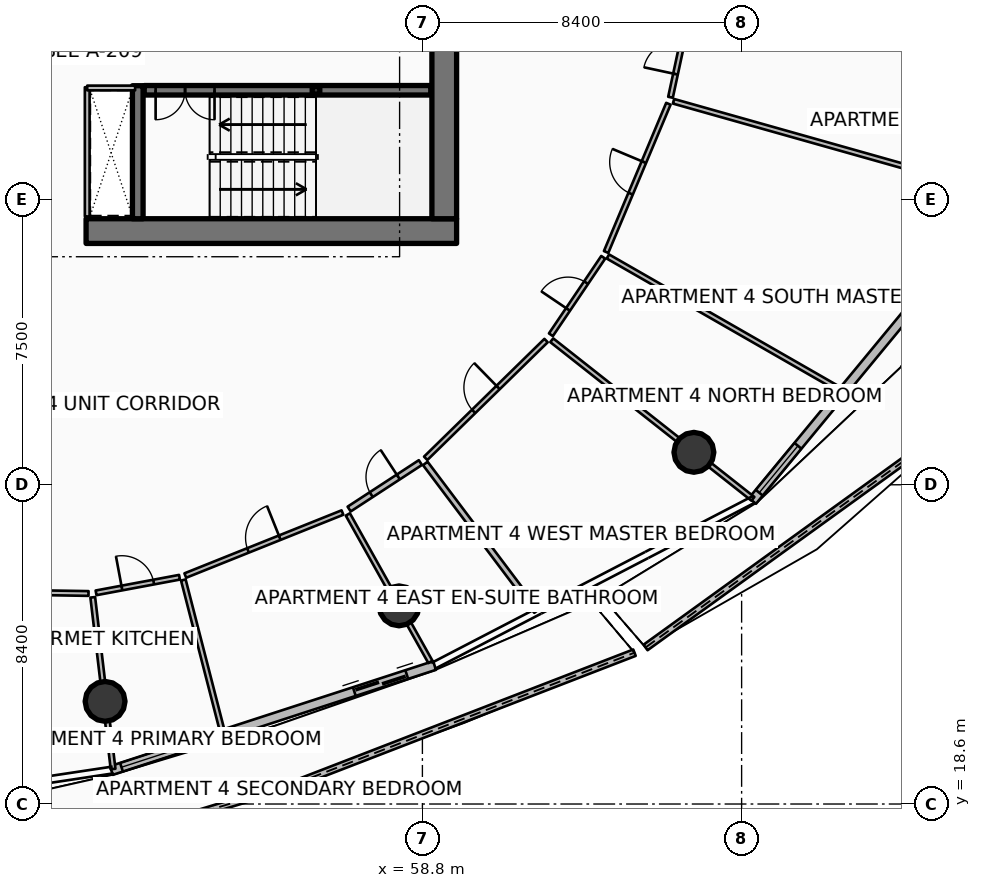
"""IFC4 building model, lengths in metres.
Left out: names, types, materials, properties, quantities, classifications, styles, units other than length and angle.
Written with IfcOpenShell. Run it as: python <this file> out.ifc"""

import sys

from ifc_helpers import new_model, si_unit, direction, frame, frame_2d, origin, origin_2d, place, context, subcontext, project, spatial, polyline, rectangle, hollow_rectangle, circle, outline, extrude, element, fill, save


model = new_model("IFC4")
c1 = context("Model", 3, precision=1e-05, world=origin(), true_north=direction((0.0, 1.0)))
c2 = subcontext(c1, "Body", "Model", "MODEL_VIEW")
j1 = project(units=[si_unit("LENGTHUNIT", "METRE"), si_unit("PLANEANGLEUNIT", "RADIAN")], contexts=[c1])
p1 = place(None, origin())
s1 = spatial("IfcSite", under=j1, at=p1, CompositionType="ELEMENT")
p2 = place(p1, origin())
s2 = spatial("IfcBuilding", under=s1, at=p2, CompositionType="ELEMENT")
p3 = place(p2, frame((0.0, 0.0, 180.3)))
s3 = spatial("IfcBuildingStorey", under=s2, at=p3, CompositionType="ELEMENT", Elevation=180.3)
p4 = place(p3, frame((49.95, 33.675, 0.0), z_axis=(0.0, 0.0, 1.0), x_axis=(1.0, 0.0, 0.0)))
e1 = element("IfcWall", 1, at=p4, inside=s3, PredefinedType="SHEAR", context=c2, shape_type="SweptSolid", body=[
    extrude(rectangle(XDim=9.75, YDim=0.65, at=frame_2d((4.875, 0.0))), origin(), (0.0, 0.0, 1.0), 3.75),
])
p5 = place(p3, frame((59.375, 34.0, 0.0), z_axis=(0.0, 0.0, 1.0), x_axis=(0.0, 1.0, 0.0)))
e2 = element("IfcWall", 2, at=p5, inside=s3, PredefinedType="SHEAR", context=c2, shape_type="SweptSolid", body=[
    extrude(rectangle(XDim=16.0, YDim=0.65, at=frame_2d((8.0, 0.0))), origin(), (0.0, 0.0, 1.0), 3.75),
])
p6 = place(p3, frame((51.31, 34.0, 0.0), z_axis=(0.0, 0.0, 1.0), x_axis=(0.0, 1.0, 0.0)))
e3 = element("IfcWall", 3, at=p6, inside=s3, PredefinedType="SHEAR", context=c2, shape_type="SweptSolid", body=[
    extrude(rectangle(XDim=3.5, YDim=0.28, at=frame_2d((1.75, 0.0))), origin(), (0.0, 0.0, 1.0), 3.75),
])
p7 = place(p3, frame((56.0, 37.38, 0.0), z_axis=(0.0, 0.0, 1.0), x_axis=(1.0, 0.0, 0.0)))
e4 = element("IfcColumn", 4, at=p7, inside=s3, PredefinedType="COLUMN", context=c2, shape_type="SweptSolid", body=[
    extrude(hollow_rectangle(XDim=0.2, YDim=0.2, WallThickness=0.01, InnerFilletRadius=0.01, OuterFilletRadius=0.02, at=origin_2d()), origin(), (0.0, 0.0, 1.0), 1.67),
])
for number, where, z_axis, x_axis in (
    (5, (50.45, 21.3, 0.0), (0.0, 0.0, 1.0), (1.0, 0.0, 0.0)),
    (6, (58.185, 23.814, 0.0), (0.0, 0.0, 1.0), (1.0, 0.0, 0.0)),
    (7, (65.944, 27.854, 0.0), (0.0, 0.0, 1.0), (1.0, 0.0, 0.0)),
):
    element("IfcColumn", number, at=place(p3, frame(where, z_axis=z_axis, x_axis=x_axis)), inside=s3, PredefinedType="COLUMN", context=c2, shape_type="SweptSolid", body=[
        extrude(circle(Radius=0.525, at=origin_2d()), origin(), (0.0, 0.0, 1.0), 3.5),
    ])
p8 = place(p3, frame((46.135, 16.298, 0.0), z_axis=(0.0, 0.0, 1.0), x_axis=(0.956822857871, 0.290671668135, 0.0)))
e8 = element("IfcWall", 8, at=p8, inside=s3, PredefinedType="PARAPET", context=c2, shape_type="SweptSolid", body=[
    extrude(outline(polyline([(0.0, 0.0), (9.598, 0.0), (9.598, 1.148), (4.799, 1.284), (0.0, 1.483), (0.0, 0.0)])), frame((0.0, 0.09, 0.0), z_axis=(0.0, -1.0, 0.0), x_axis=(1.0, 0.0, 0.0)), (0.0, 0.0, 1.0), 0.18),
])
p9 = place(p3, frame((55.545, 19.166, 0.0), z_axis=(0.0, 0.0, 1.0), x_axis=(0.932733135956, 0.360567465378, 0.0)))
e9 = element("IfcWall", 9, at=p9, inside=s3, PredefinedType="PARAPET", context=c2, shape_type="SweptSolid", body=[
    extrude(outline(polyline([(0.0, 0.0), (9.473, 0.0), (9.473, 1.224), (4.736, 1.127), (0.0, 1.148), (0.0, 0.0)])), frame((0.0, 0.09, 0.0), z_axis=(0.0, -1.0, 0.0), x_axis=(1.0, 0.0, 0.0)), (0.0, 0.0, 1.0), 0.18),
])
p10 = place(p3, frame((64.672, 22.719, 0.0), z_axis=(0.0, 0.0, 1.0), x_axis=(0.810676817558, 0.585493891919, 0.0)))
e10 = element("IfcWall", 10, at=p10, inside=s3, PredefinedType="PARAPET", context=c2, shape_type="SweptSolid", body=[
    extrude(outline(polyline([(0.0, 0.0), (10.681, 0.0), (10.681, 1.632), (5.341, 1.418), (0.0, 1.233), (0.0, 0.0)])), frame((0.0, 0.09, 0.0), z_axis=(0.0, -1.0, 0.0), x_axis=(1.0, 0.0, 0.0)), (0.0, 0.0, 1.0), 0.18),
])
p11 = place(p3, frame((50.616, 19.481, 0.0), z_axis=(0.0, 0.0, 1.0), x_axis=(0.951058543936, 0.309010753869, 0.0)))
e11 = element("IfcWall", 11, at=p11, inside=s3, PredefinedType="SOLIDWALL", context=c2, shape_type="SweptSolid", body=[
    extrude(rectangle(XDim=8.942, YDim=0.24, at=frame_2d((4.471, 0.0))), origin(), (0.0, 0.0, 1.0), 2.45),
])
p12 = place(p11, frame((6.722, 0.0, 0.0)))
e12 = element("IfcOpeningElement", 12, at=p12, cuts=e11, PredefinedType="OPENING", context=c2, shape_type="SweptSolid", body=[
    extrude(rectangle(XDim=1.45, YDim=2.15, at=frame_2d((0.725, 1.075))), frame((0.0, 0.13, 0.0), z_axis=(0.0, -1.0, 0.0), x_axis=(1.0, 0.0, 0.0)), (0.0, 0.0, 1.0), 0.26),
])
p13 = place(p11, frame((0.28, 0.0, 0.65)))
e13 = element("IfcOpeningElement", 13, at=p13, cuts=e11, PredefinedType="OPENING", context=c2, shape_type="SweptSolid", body=[
    extrude(rectangle(XDim=1.6, YDim=1.5, at=frame_2d((0.8, 0.75))), frame((0.0, 0.13, 0.0), z_axis=(0.0, -1.0, 0.0), x_axis=(1.0, 0.0, 0.0)), (0.0, 0.0, 1.0), 0.26),
])
p14 = place(p3, frame((67.485, 26.576, 0.0), z_axis=(0.0, 0.0, 1.0), x_axis=(0.636759394418, 0.771062561418, 0.0)))
e14 = element("IfcWall", 14, at=p14, inside=s3, PredefinedType="SOLIDWALL", context=c2, shape_type="SweptSolid", body=[
    extrude(rectangle(XDim=10.494, YDim=0.24, at=frame_2d((5.247, 0.0))), origin(), (0.0, 0.0, 1.0), 2.45),
])
p15 = place(p14, frame((8.274, 0.0, 0.0)))
e15 = element("IfcOpeningElement", 15, at=p15, cuts=e14, PredefinedType="OPENING", context=c2, shape_type="SweptSolid", body=[
    extrude(rectangle(XDim=1.45, YDim=2.15, at=frame_2d((0.725, 1.075))), frame((0.0, 0.13, 0.0), z_axis=(0.0, -1.0, 0.0), x_axis=(1.0, 0.0, 0.0)), (0.0, 0.0, 1.0), 0.26),
])
p16 = place(p14, frame((0.28, 0.0, 0.65)))
e16 = element("IfcOpeningElement", 16, at=p16, cuts=e14, PredefinedType="OPENING", context=c2, shape_type="SweptSolid", body=[
    extrude(rectangle(XDim=1.6, YDim=1.5, at=frame_2d((0.8, 0.75))), frame((0.0, 0.13, 0.0), z_axis=(0.0, -1.0, 0.0), x_axis=(1.0, 0.0, 0.0)), (0.0, 0.0, 1.0), 0.26),
])
p17 = place(p3, frame((51.48, 37.38, 0.0), z_axis=(0.0, 0.0, 1.0), x_axis=(1.0, 0.0, 0.0)))
e17 = element("IfcWall", 17, at=p17, inside=s3, PredefinedType="SOLIDWALL", context=c2, shape_type="SweptSolid", body=[
    extrude(rectangle(XDim=7.54, YDim=0.25, at=frame_2d((3.77, 0.0))), origin(), (0.0, 0.0, 1.0), 3.5),
])
p18 = place(p17, frame((0.3, 0.0, 0.0)))
e18 = element("IfcOpeningElement", 18, at=p18, cuts=e17, PredefinedType="OPENING", context=c2, shape_type="SweptSolid", body=[
    extrude(rectangle(XDim=1.55, YDim=2.15, at=frame_2d((0.775, 1.075))), frame((0.0, 0.135, 0.0), z_axis=(0.0, -1.0, 0.0), x_axis=(1.0, 0.0, 0.0)), (0.0, 0.0, 1.0), 0.27),
])
p19 = place(p3, frame((49.98, 34.06, 0.0), z_axis=(0.0, 0.0, 1.0), x_axis=(0.0, 1.0, 0.0)))
e19 = element("IfcWall", 19, at=p19, inside=s3, PredefinedType="PARTITIONING", context=c2, shape_type="SweptSolid", body=[
    extrude(rectangle(XDim=3.4, YDim=0.125, at=frame_2d((1.7, 0.0))), origin(), (0.0, 0.0, 1.0), 2.94),
])
p20 = place(p3, frame((49.98, 37.44, 0.0), z_axis=(0.0, 0.0, 1.0), x_axis=(1.0, 0.0, 0.0)))
e20 = element("IfcWall", 20, at=p20, inside=s3, PredefinedType="PARTITIONING", context=c2, shape_type="SweptSolid", body=[
    extrude(rectangle(XDim=1.26, YDim=0.125, at=frame_2d((0.63, 0.0))), origin(), (0.0, 0.0, 1.0), 2.94),
])
p21 = place(p3, frame((45.402, 24.214, 0.0), z_axis=(0.0, 0.0, 1.0), x_axis=(0.999870557478, -0.016089384368, 0.0)))
e21 = element("IfcWall", 21, at=p21, inside=s3, PredefinedType="PARTITIONING", context=c2, shape_type="SweptSolid", body=[
    extrude(rectangle(XDim=4.613, YDim=0.125, at=frame_2d((2.306, 0.0))), origin(), (0.0, 0.0, 1.0), 2.94),
])
p22 = place(p21, frame((1.856, 0.0, 0.0)))
e22 = element("IfcOpeningElement", 22, at=p22, cuts=e21, PredefinedType="OPENING", context=c2, shape_type="SweptSolid", body=[
    extrude(rectangle(XDim=0.9, YDim=2.08, at=frame_2d((0.45, 1.04))), frame((0.0, 0.073, 0.0), z_axis=(0.0, -1.0, 0.0), x_axis=(1.0, 0.0, 0.0)), (0.0, 0.0, 1.0), 0.145),
])
p23 = place(p3, frame((50.126, 24.038, 0.0), z_axis=(0.0, 0.0, 1.0), x_axis=(0.117498349672, -0.993073077787, 0.0)))
e23 = element("IfcWall", 23, at=p23, inside=s3, PredefinedType="PARTITIONING", context=c2, shape_type="SweptSolid", body=[
    extrude(rectangle(XDim=4.548, YDim=0.125, at=frame_2d((2.274, 0.0))), origin(), (0.0, 0.0, 1.0), 2.94),
])
p24 = place(p3, frame((52.51, 24.494, 0.0), z_axis=(0.0, 0.0, 1.0), x_axis=(0.249438502074, -0.968390641055, 0.0)))
e24 = element("IfcWall", 24, at=p24, inside=s3, PredefinedType="PARTITIONING", context=c2, shape_type="SweptSolid", body=[
    extrude(rectangle(XDim=4.066, YDim=0.125, at=frame_2d((2.033, 0.0))), origin(), (0.0, 0.0, 1.0), 2.94),
])
p25 = place(p3, frame((50.212, 24.156, 0.0), z_axis=(0.0, 0.0, 1.0), x_axis=(0.982938932549, 0.183932201855, 0.0)))
e25 = element("IfcWall", 25, at=p25, inside=s3, PredefinedType="PARTITIONING", context=c2, shape_type="SweptSolid", body=[
    extrude(rectangle(XDim=2.234, YDim=0.125, at=frame_2d((1.117, 0.0))), origin(), (0.0, 0.0, 1.0), 2.94),
])
p26 = place(p25, frame((0.692, 0.0, 0.0)))
e26 = element("IfcOpeningElement", 26, at=p26, cuts=e25, PredefinedType="OPENING", context=c2, shape_type="SweptSolid", body=[
    extrude(rectangle(XDim=0.85, YDim=2.06, at=frame_2d((0.425, 1.03))), frame((0.0, 0.073, 0.0), z_axis=(0.0, -1.0, 0.0), x_axis=(1.0, 0.0, 0.0)), (0.0, 0.0, 1.0), 0.145),
])
p27 = place(p3, frame((52.561, 24.611, 0.0), z_axis=(0.0, 0.0, 1.0), x_axis=(0.92816265329, 0.372174809784, 0.0)))
e27 = element("IfcWall", 27, at=p27, inside=s3, PredefinedType="PARTITIONING", context=c2, shape_type="SweptSolid", body=[
    extrude(rectangle(XDim=4.455, YDim=0.125, at=frame_2d((2.228, 0.0))), origin(), (0.0, 0.0, 1.0), 2.94),
])
p28 = place(p27, frame((1.777, 0.0, 0.0)))
e28 = element("IfcOpeningElement", 28, at=p28, cuts=e27, PredefinedType="OPENING", context=c2, shape_type="SweptSolid", body=[
    extrude(rectangle(XDim=0.9, YDim=2.08, at=frame_2d((0.45, 1.04))), frame((0.0, 0.073, 0.0), z_axis=(0.0, -1.0, 0.0), x_axis=(1.0, 0.0, 0.0)), (0.0, 0.0, 1.0), 0.145),
])
p29 = place(p3, frame((56.838, 26.219, 0.0), z_axis=(0.0, 0.0, 1.0), x_axis=(0.488608382443, -0.872503208365, 0.0)))
e29 = element("IfcWall", 29, at=p29, inside=s3, PredefinedType="PARTITIONING", context=c2, shape_type="SweptSolid", body=[
    extrude(rectangle(XDim=4.448, YDim=0.125, at=frame_2d((2.224, 0.0))), origin(), (0.0, 0.0, 1.0), 2.94),
])
p30 = place(p3, frame((56.873, 26.361, 0.0), z_axis=(0.0, 0.0, 1.0), x_axis=(0.837497725381, 0.54644081105, 0.0)))
e30 = element("IfcWall", 30, at=p30, inside=s3, PredefinedType="PARTITIONING", context=c2, shape_type="SweptSolid", body=[
    extrude(rectangle(XDim=2.238, YDim=0.15, at=frame_2d((1.119, 0.0))), origin(), (0.0, 0.0, 1.0), 2.94),
])
p31 = place(p30, frame((0.694, 0.0, 0.0)))
e31 = element("IfcOpeningElement", 31, at=p31, cuts=e30, PredefinedType="OPENING", context=c2, shape_type="SweptSolid", body=[
    extrude(rectangle(XDim=0.85, YDim=2.06, at=frame_2d((0.425, 1.03))), frame((0.0, 0.085, 0.0), z_axis=(0.0, -1.0, 0.0), x_axis=(1.0, 0.0, 0.0)), (0.0, 0.0, 1.0), 0.17),
])
p32 = place(p3, frame((58.876, 27.561, 0.0), z_axis=(0.0, 0.0, 1.0), x_axis=(0.601652635262, -0.798757852219, 0.0)))
e32 = element("IfcWall", 32, at=p32, inside=s3, PredefinedType="PARTITIONING", context=c2, shape_type="SweptSolid", body=[
    extrude(rectangle(XDim=4.865, YDim=0.15, at=frame_2d((2.433, 0.0))), origin(), (0.0, 0.0, 1.0), 2.94),
])
p33 = place(p3, frame((58.887, 27.696, 0.0), z_axis=(0.0, 0.0, 1.0), x_axis=(0.714833426799, 0.699294767556, 0.0)))
e33 = element("IfcWall", 33, at=p33, inside=s3, PredefinedType="PARTITIONING", context=c2, shape_type="SweptSolid", body=[
    extrude(rectangle(XDim=4.431, YDim=0.125, at=frame_2d((2.215, 0.0))), origin(), (0.0, 0.0, 1.0), 2.94),
])
p34 = place(p33, frame((1.765, 0.0, 0.0)))
e34 = element("IfcOpeningElement", 34, at=p34, cuts=e33, PredefinedType="OPENING", context=c2, shape_type="SweptSolid", body=[
    extrude(rectangle(XDim=0.9, YDim=2.08, at=frame_2d((0.45, 1.04))), frame((0.0, 0.073, 0.0), z_axis=(0.0, -1.0, 0.0), x_axis=(1.0, 0.0, 0.0)), (0.0, 0.0, 1.0), 0.145),
])
p35 = place(p3, frame((62.204, 30.802, 0.0), z_axis=(0.0, 0.0, 1.0), x_axis=(0.785315561472, -0.619095686393, 0.0)))
e35 = element("IfcWall", 35, at=p35, inside=s3, PredefinedType="PARTITIONING", context=c2, shape_type="SweptSolid", body=[
    extrude(rectangle(XDim=6.74, YDim=0.125, at=frame_2d((3.37, 0.0))), origin(), (0.0, 0.0, 1.0), 2.94),
])
p36 = place(p3, frame((63.681, 33.007, 0.0), z_axis=(0.0, 0.0, 1.0), x_axis=(0.867459238173, -0.497508261347, 0.0)))
e36 = element("IfcWall", 36, at=p36, inside=s3, PredefinedType="PARTITIONING", context=c2, shape_type="SweptSolid", body=[
    extrude(rectangle(XDim=7.005, YDim=0.125, at=frame_2d((3.502, 0.0))), origin(), (0.0, 0.0, 1.0), 2.94),
])
p37 = place(p3, frame((62.181, 30.947, 0.0), z_axis=(0.0, 0.0, 1.0), x_axis=(0.559798463615, 0.82862879514, 0.0)))
e37 = element("IfcWall", 37, at=p37, inside=s3, PredefinedType="PARTITIONING", context=c2, shape_type="SweptSolid", body=[
    extrude(rectangle(XDim=2.459, YDim=0.125, at=frame_2d((1.229, 0.0))), origin(), (0.0, 0.0, 1.0), 2.94),
])
p38 = place(p37, frame((0.805, 0.0, 0.0)))
e38 = element("IfcOpeningElement", 38, at=p38, cuts=e37, PredefinedType="OPENING", context=c2, shape_type="SweptSolid", body=[
    extrude(rectangle(XDim=0.85, YDim=2.06, at=frame_2d((0.425, 1.03))), frame((0.0, 0.073, 0.0), z_axis=(0.0, -1.0, 0.0), x_axis=(1.0, 0.0, 0.0)), (0.0, 0.0, 1.0), 0.145),
])
p39 = place(p3, frame((63.634, 33.125, 0.0), z_axis=(0.0, 0.0, 1.0), x_axis=(0.387404173838, 0.921909977217, 0.0)))
e39 = element("IfcWall", 39, at=p39, inside=s3, PredefinedType="PARTITIONING", context=c2, shape_type="SweptSolid", body=[
    extrude(rectangle(XDim=4.23, YDim=0.125, at=frame_2d((2.115, 0.0))), origin(), (0.0, 0.0, 1.0), 2.94),
])
p40 = place(p39, frame((1.665, 0.0, 0.0)))
e40 = element("IfcOpeningElement", 40, at=p40, cuts=e39, PredefinedType="OPENING", context=c2, shape_type="SweptSolid", body=[
    extrude(rectangle(XDim=0.9, YDim=2.08, at=frame_2d((0.45, 1.04))), frame((0.0, 0.073, 0.0), z_axis=(0.0, -1.0, 0.0), x_axis=(1.0, 0.0, 0.0)), (0.0, 0.0, 1.0), 0.145),
])
p41 = place(p3, frame((65.408, 37.091, 0.0), z_axis=(0.0, 0.0, 1.0), x_axis=(0.962449675986, -0.271460165022, 0.0)))
e41 = element("IfcWall", 41, at=p41, inside=s3, PredefinedType="PARTITIONING", context=c2, shape_type="SweptSolid", body=[
    extrude(rectangle(XDim=8.943, YDim=0.125, at=frame_2d((4.472, 0.0))), origin(), (0.0, 0.0, 1.0), 2.94),
])
p42 = place(p3, frame((65.876, 39.312, 0.0), z_axis=(0.0, 0.0, 1.0), x_axis=(0.988883657875, -0.148691328556, 0.0)))
e42 = element("IfcWall", 42, at=p42, inside=s3, PredefinedType="PARTITIONING", context=c2, shape_type="SweptSolid", body=[
    extrude(rectangle(XDim=9.05, YDim=0.125, at=frame_2d((4.525, 0.0))), origin(), (0.0, 0.0, 1.0), 2.94),
])
p43 = place(p3, frame((65.329, 37.196, 0.0), z_axis=(0.0, 0.0, 1.0), x_axis=(0.21043464324, 0.977607928019, 0.0)))
e43 = element("IfcWall", 43, at=p43, inside=s3, PredefinedType="PARTITIONING", context=c2, shape_type="SweptSolid", body=[
    extrude(rectangle(XDim=2.099, YDim=0.125, at=frame_2d((1.049, 0.0))), origin(), (0.0, 0.0, 1.0), 2.94),
])
p44 = place(p43, frame((0.625, 0.0, 0.0)))
e44 = element("IfcOpeningElement", 44, at=p44, cuts=e43, PredefinedType="OPENING", context=c2, shape_type="SweptSolid", body=[
    extrude(rectangle(XDim=0.85, YDim=2.06, at=frame_2d((0.425, 1.03))), frame((0.0, 0.073, 0.0), z_axis=(0.0, -1.0, 0.0), x_axis=(1.0, 0.0, 0.0)), (0.0, 0.0, 1.0), 0.145),
])
p45 = place(p12, origin())
e45 = element("IfcDoor", 45, at=p45, inside=s3, OperationType="DOUBLE_DOOR_SLIDING", PredefinedType="DOOR", context=c2, shape_type="SweptSolid", body=[
    extrude(rectangle(XDim=1.45, YDim=2.15, at=frame_2d((0.725, 1.075))), frame((0.0, 0.025, 0.0), z_axis=(0.0, -1.0, 0.0), x_axis=(1.0, 0.0, 0.0)), (0.0, 0.0, 1.0), 0.05),
])
fill(e12, e45)
p46 = place(p13, origin())
e46 = element("IfcWindow", 46, at=p46, inside=s3, PartitioningType="SINGLE_PANEL", PredefinedType="WINDOW", context=c2, shape_type="SweptSolid", body=[
    extrude(rectangle(XDim=1.6, YDim=1.5, at=frame_2d((0.8, 0.75))), frame((0.0, 0.03, 0.0), z_axis=(0.0, -1.0, 0.0), x_axis=(1.0, 0.0, 0.0)), (0.0, 0.0, 1.0), 0.06),
])
fill(e13, e46)
p47 = place(p16, origin())
e47 = element("IfcWindow", 47, at=p47, inside=s3, PartitioningType="SINGLE_PANEL", PredefinedType="WINDOW", context=c2, shape_type="SweptSolid", body=[
    extrude(rectangle(XDim=1.6, YDim=1.5, at=frame_2d((0.8, 0.75))), frame((0.0, 0.03, 0.0), z_axis=(0.0, -1.0, 0.0), x_axis=(1.0, 0.0, 0.0)), (0.0, 0.0, 1.0), 0.06),
])
fill(e16, e47)
p48 = place(p18, origin())
e48 = element("IfcDoor", 48, at=p48, inside=s3, OperationType="DOUBLE_DOOR_SINGLE_SWING", PredefinedType="DOOR", context=c2, shape_type="SweptSolid", body=[
    extrude(rectangle(XDim=1.55, YDim=2.15, at=frame_2d((0.775, 1.075))), frame((0.0, 0.025, 0.0), z_axis=(0.0, -1.0, 0.0), x_axis=(1.0, 0.0, 0.0)), (0.0, 0.0, 1.0), 0.05),
])
fill(e18, e48)
p49 = place(p26, origin())
e49 = element("IfcDoor", 49, at=p49, inside=s3, OperationType="SINGLE_SWING_LEFT", PredefinedType="DOOR", context=c2, shape_type="SweptSolid", body=[
    extrude(rectangle(XDim=0.85, YDim=2.06, at=frame_2d((0.425, 1.03))), frame((0.0, 0.025, 0.0), z_axis=(0.0, -1.0, 0.0), x_axis=(1.0, 0.0, 0.0)), (0.0, 0.0, 1.0), 0.05),
])
fill(e26, e49)
p50 = place(p28, origin())
e50 = element("IfcDoor", 50, at=p50, inside=s3, OperationType="SINGLE_SWING_RIGHT", PredefinedType="DOOR", context=c2, shape_type="SweptSolid", body=[
    extrude(rectangle(XDim=0.9, YDim=2.08, at=frame_2d((0.45, 1.04))), frame((0.0, 0.025, 0.0), z_axis=(0.0, -1.0, 0.0), x_axis=(1.0, 0.0, 0.0)), (0.0, 0.0, 1.0), 0.05),
])
fill(e28, e50)
p51 = place(p31, origin())
e51 = element("IfcDoor", 51, at=p51, inside=s3, OperationType="SINGLE_SWING_RIGHT", PredefinedType="DOOR", context=c2, shape_type="SweptSolid", body=[
    extrude(rectangle(XDim=0.85, YDim=2.06, at=frame_2d((0.425, 1.03))), frame((0.0, 0.025, 0.0), z_axis=(0.0, -1.0, 0.0), x_axis=(1.0, 0.0, 0.0)), (0.0, 0.0, 1.0), 0.05),
])
fill(e31, e51)
p52 = place(p34, origin())
e52 = element("IfcDoor", 52, at=p52, inside=s3, OperationType="SINGLE_SWING_RIGHT", PredefinedType="DOOR", context=c2, shape_type="SweptSolid", body=[
    extrude(rectangle(XDim=0.9, YDim=2.08, at=frame_2d((0.45, 1.04))), frame((0.0, 0.025, 0.0), z_axis=(0.0, -1.0, 0.0), x_axis=(1.0, 0.0, 0.0)), (0.0, 0.0, 1.0), 0.05),
])
fill(e34, e52)
p53 = place(p38, origin())
e53 = element("IfcDoor", 53, at=p53, inside=s3, OperationType="SINGLE_SWING_LEFT", PredefinedType="DOOR", context=c2, shape_type="SweptSolid", body=[
    extrude(rectangle(XDim=0.85, YDim=2.06, at=frame_2d((0.425, 1.03))), frame((0.0, 0.025, 0.0), z_axis=(0.0, -1.0, 0.0), x_axis=(1.0, 0.0, 0.0)), (0.0, 0.0, 1.0), 0.05),
])
fill(e38, e53)
p54 = place(p40, origin())
e54 = element("IfcDoor", 54, at=p54, inside=s3, OperationType="SINGLE_SWING_RIGHT", PredefinedType="DOOR", context=c2, shape_type="SweptSolid", body=[
    extrude(rectangle(XDim=0.9, YDim=2.08, at=frame_2d((0.45, 1.04))), frame((0.0, 0.025, 0.0), z_axis=(0.0, -1.0, 0.0), x_axis=(1.0, 0.0, 0.0)), (0.0, 0.0, 1.0), 0.05),
])
fill(e40, e54)
p55 = place(p44, origin())
e55 = element("IfcDoor", 55, at=p55, inside=s3, OperationType="SINGLE_SWING_LEFT", PredefinedType="DOOR", context=c2, shape_type="SweptSolid", body=[
    extrude(rectangle(XDim=0.85, YDim=2.06, at=frame_2d((0.425, 1.03))), frame((0.0, 0.025, 0.0), z_axis=(0.0, -1.0, 0.0), x_axis=(1.0, 0.0, 0.0)), (0.0, 0.0, 1.0), 0.05),
])
fill(e44, e55)
save(model, sys.argv[1])
